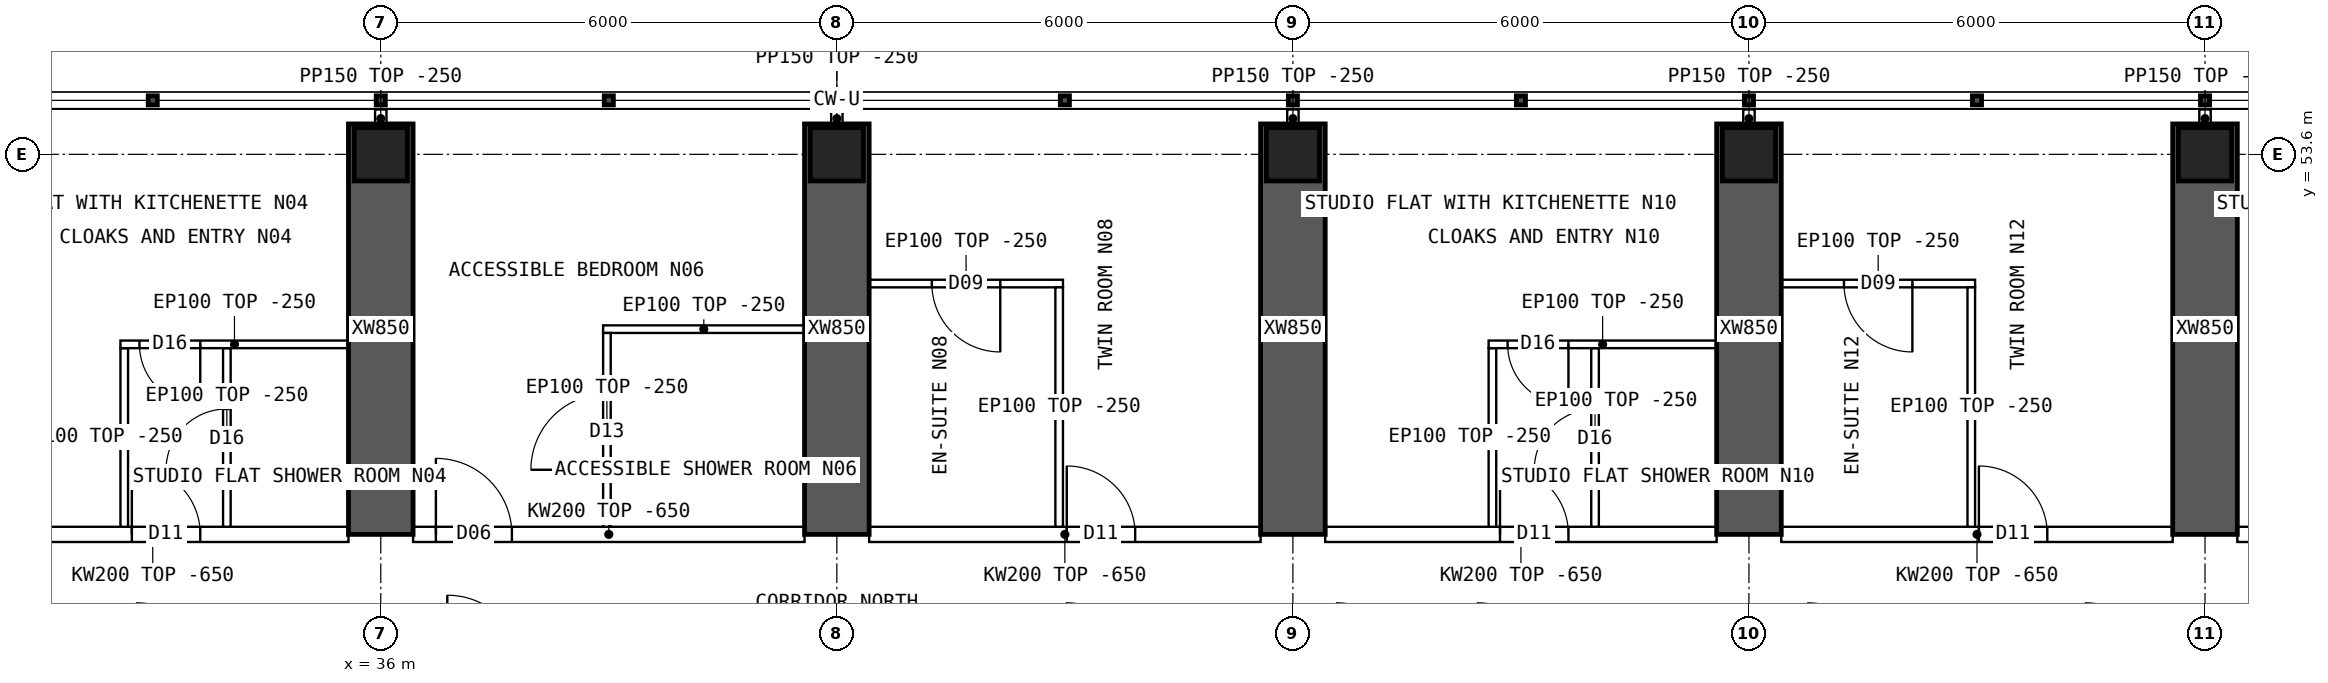
"""IFC4 building model, lengths in metres.
Left out: names, types, materials, properties, quantities, classifications, styles, units other than length and angle.
Written with IfcOpenShell. Run it as: python <this file> out.ifc"""

import sys

from ifc_helpers import new_model, si_unit, direction, frame, frame_2d, origin, origin_2d, place, context, subcontext, project, spatial, polyline, rectangle, hollow_rectangle, outline, extrude, element, fill, save


model = new_model("IFC4")
c1 = context("Model", 3, precision=1e-05, world=origin(), true_north=direction((0.0, 1.0)))
c2 = subcontext(c1, "Body", "Model", "MODEL_VIEW")
j1 = project(units=[si_unit("LENGTHUNIT", "METRE"), si_unit("PLANEANGLEUNIT", "RADIAN")], contexts=[c1])
p1 = place(None, origin())
s1 = spatial("IfcSite", under=j1, at=p1, CompositionType="ELEMENT")
p2 = place(p1, origin())
s2 = spatial("IfcBuilding", under=s1, at=p2, CompositionType="ELEMENT")
p3 = place(p2, frame((0.0, 0.0, 178.6)))
s3 = spatial("IfcBuildingStorey", under=s2, at=p3, CompositionType="ELEMENT", Elevation=178.6)
for number, where, z_axis, x_axis in (
    (1, (36.0, 53.6, 0.0), (0.0, 0.0, 1.0), (1.0, 0.0, 0.0)),
    (2, (42.0, 53.6, 0.0), (0.0, 0.0, 1.0), (1.0, 0.0, 0.0)),
    (3, (48.0, 53.6, 0.0), (0.0, 0.0, 1.0), (1.0, 0.0, 0.0)),
    (4, (54.0, 53.6, 0.0), (0.0, 0.0, 1.0), (1.0, 0.0, 0.0)),
    (5, (60.0, 53.6, 0.0), (0.0, 0.0, 1.0), (1.0, 0.0, 0.0)),
):
    element("IfcColumn", number, at=place(p3, frame(where, z_axis=z_axis, x_axis=x_axis)), inside=s3, PredefinedType="COLUMN", context=c2, shape_type="SweptSolid", body=[
        extrude(hollow_rectangle(XDim=0.7, YDim=0.7, WallThickness=0.07, at=origin_2d()), origin(), (0.0, 0.0, 1.0), 3.75),
    ])
for number, where, z_axis, x_axis in (
    (6, (36.0, 48.6, 0.0), (0.0, 0.0, 1.0), (0.0, 1.0, 0.0)),
    (7, (42.0, 48.6, 0.0), (0.0, 0.0, 1.0), (0.0, 1.0, 0.0)),
    (8, (48.0, 48.6, 0.0), (0.0, 0.0, 1.0), (0.0, 1.0, 0.0)),
    (9, (54.0, 48.6, 0.0), (0.0, 0.0, 1.0), (0.0, 1.0, 0.0)),
    (10, (60.0, 48.6, 0.0), (0.0, 0.0, 1.0), (0.0, 1.0, 0.0)),
):
    element("IfcWall", number, at=place(p3, frame(where, z_axis=z_axis, x_axis=x_axis)), inside=s3, PredefinedType="SHEAR", context=c2, shape_type="SweptSolid", body=[
        extrude(rectangle(XDim=5.4, YDim=0.85, at=frame_2d((2.7, 0.0))), origin(), (0.0, 0.0, 1.0), 3.75),
    ])
p4 = place(p3, frame((30.425, 48.6, 0.0), z_axis=(0.0, 0.0, 1.0), x_axis=(1.0, 0.0, 0.0)))
e11 = element("IfcWall", 11, at=p4, inside=s3, PredefinedType="SOLIDWALL", context=c2, shape_type="SweptSolid", body=[
    extrude(outline(polyline([(0.0, 0.0), (5.15, 0.0), (5.15, 3.1), (0.0, 3.1), (0.0, 0.0)])), frame((0.0, 0.1, 0.0), z_axis=(0.0, -1.0, 0.0), x_axis=(1.0, 0.0, 0.0)), (0.0, 0.0, 1.0), 0.2),
])
p5 = place(p4, frame((2.3, 0.0, 0.0)))
e12 = element("IfcOpeningElement", 12, at=p5, cuts=e11, PredefinedType="OPENING", context=c2, shape_type="SweptSolid", body=[
    extrude(rectangle(XDim=0.9, YDim=2.1, at=frame_2d((0.45, 1.05))), frame((0.0, 0.11, 0.0), z_axis=(0.0, -1.0, 0.0), x_axis=(1.0, 0.0, 0.0)), (0.0, 0.0, 1.0), 0.22),
])
p6 = place(p3, frame((36.425, 48.6, 0.0), z_axis=(0.0, 0.0, 1.0), x_axis=(1.0, 0.0, 0.0)))
e13 = element("IfcWall", 13, at=p6, inside=s3, PredefinedType="SOLIDWALL", context=c2, shape_type="SweptSolid", body=[
    extrude(outline(polyline([(0.0, 0.0), (5.15, 0.0), (5.15, 3.1), (0.0, 3.1), (0.0, 0.0)])), frame((0.0, 0.1, 0.0), z_axis=(0.0, -1.0, 0.0), x_axis=(1.0, 0.0, 0.0)), (0.0, 0.0, 1.0), 0.2),
])
p7 = place(p6, frame((0.3, 0.0, 0.0)))
e14 = element("IfcOpeningElement", 14, at=p7, cuts=e13, PredefinedType="OPENING", context=c2, shape_type="SweptSolid", body=[
    extrude(rectangle(XDim=1.0, YDim=2.1, at=frame_2d((0.5, 1.05))), frame((0.0, 0.11, 0.0), z_axis=(0.0, -1.0, 0.0), x_axis=(1.0, 0.0, 0.0)), (0.0, 0.0, 1.0), 0.22),
])
p8 = place(p3, frame((42.425, 48.6, 0.0), z_axis=(0.0, 0.0, 1.0), x_axis=(1.0, 0.0, 0.0)))
e15 = element("IfcWall", 15, at=p8, inside=s3, PredefinedType="SOLIDWALL", context=c2, shape_type="SweptSolid", body=[
    extrude(outline(polyline([(0.0, 0.0), (5.15, 0.0), (5.15, 3.1), (0.0, 3.1), (0.0, 0.0)])), frame((0.0, 0.1, 0.0), z_axis=(0.0, -1.0, 0.0), x_axis=(1.0, 0.0, 0.0)), (0.0, 0.0, 1.0), 0.2),
])
p9 = place(p8, frame((2.6, 0.0, 0.0)))
e16 = element("IfcOpeningElement", 16, at=p9, cuts=e15, PredefinedType="OPENING", context=c2, shape_type="SweptSolid", body=[
    extrude(rectangle(XDim=0.9, YDim=2.1, at=frame_2d((0.45, 1.05))), frame((0.0, 0.11, 0.0), z_axis=(0.0, -1.0, 0.0), x_axis=(1.0, 0.0, 0.0)), (0.0, 0.0, 1.0), 0.22),
])
p10 = place(p3, frame((48.425, 48.6, 0.0), z_axis=(0.0, 0.0, 1.0), x_axis=(1.0, 0.0, 0.0)))
e17 = element("IfcWall", 17, at=p10, inside=s3, PredefinedType="SOLIDWALL", context=c2, shape_type="SweptSolid", body=[
    extrude(outline(polyline([(0.0, 0.0), (5.15, 0.0), (5.15, 3.1), (0.0, 3.1), (0.0, 0.0)])), frame((0.0, 0.1, 0.0), z_axis=(0.0, -1.0, 0.0), x_axis=(1.0, 0.0, 0.0)), (0.0, 0.0, 1.0), 0.2),
])
p11 = place(p10, frame((2.3, 0.0, 0.0)))
e18 = element("IfcOpeningElement", 18, at=p11, cuts=e17, PredefinedType="OPENING", context=c2, shape_type="SweptSolid", body=[
    extrude(rectangle(XDim=0.9, YDim=2.1, at=frame_2d((0.45, 1.05))), frame((0.0, 0.11, 0.0), z_axis=(0.0, -1.0, 0.0), x_axis=(1.0, 0.0, 0.0)), (0.0, 0.0, 1.0), 0.22),
])
p12 = place(p3, frame((54.425, 48.6, 0.0), z_axis=(0.0, 0.0, 1.0), x_axis=(1.0, 0.0, 0.0)))
e19 = element("IfcWall", 19, at=p12, inside=s3, PredefinedType="SOLIDWALL", context=c2, shape_type="SweptSolid", body=[
    extrude(outline(polyline([(0.0, 0.0), (5.15, 0.0), (5.15, 3.1), (0.0, 3.1), (0.0, 0.0)])), frame((0.0, 0.1, 0.0), z_axis=(0.0, -1.0, 0.0), x_axis=(1.0, 0.0, 0.0)), (0.0, 0.0, 1.0), 0.2),
])
p13 = place(p12, frame((2.6, 0.0, 0.0)))
e20 = element("IfcOpeningElement", 20, at=p13, cuts=e19, PredefinedType="OPENING", context=c2, shape_type="SweptSolid", body=[
    extrude(rectangle(XDim=0.9, YDim=2.1, at=frame_2d((0.45, 1.05))), frame((0.0, 0.11, 0.0), z_axis=(0.0, -1.0, 0.0), x_axis=(1.0, 0.0, 0.0)), (0.0, 0.0, 1.0), 0.22),
])
p14 = place(p3, frame((60.425, 48.6, 0.0), z_axis=(0.0, 0.0, 1.0), x_axis=(1.0, 0.0, 0.0)))
e21 = element("IfcWall", 21, at=p14, inside=s3, PredefinedType="SOLIDWALL", context=c2, shape_type="SweptSolid", body=[
    extrude(outline(polyline([(0.0, 0.0), (5.15, 0.0), (5.15, 3.1), (0.0, 3.1), (0.0, 0.0)])), frame((0.0, 0.1, 0.0), z_axis=(0.0, -1.0, 0.0), x_axis=(1.0, 0.0, 0.0)), (0.0, 0.0, 1.0), 0.2),
])
p15 = place(p14, frame((2.3, 0.0, 0.0)))
e22 = element("IfcOpeningElement", 22, at=p15, cuts=e21, PredefinedType="OPENING", context=c2, shape_type="SweptSolid", body=[
    extrude(rectangle(XDim=0.9, YDim=2.1, at=frame_2d((0.45, 1.05))), frame((0.0, 0.11, 0.0), z_axis=(0.0, -1.0, 0.0), x_axis=(1.0, 0.0, 0.0)), (0.0, 0.0, 1.0), 0.22),
])
p16 = place(p3, frame((32.575, 51.1, 0.0), z_axis=(0.0, 0.0, 1.0), x_axis=(1.0, 0.0, 0.0)))
e23 = element("IfcWall", 23, at=p16, inside=s3, PredefinedType="PARTITIONING", context=c2, shape_type="SweptSolid", body=[
    extrude(rectangle(XDim=3.0, YDim=0.1, at=frame_2d((1.5, 0.0))), origin(), (0.0, 0.0, 1.0), 3.5),
])
p17 = place(p16, frame((0.25, 0.0, 0.0)))
e24 = element("IfcOpeningElement", 24, at=p17, cuts=e23, PredefinedType="OPENING", context=c2, shape_type="SweptSolid", body=[
    extrude(rectangle(XDim=0.8, YDim=2.1, at=frame_2d((0.4, 1.05))), frame((0.0, 0.06, 0.0), z_axis=(0.0, -1.0, 0.0), x_axis=(1.0, 0.0, 0.0)), (0.0, 0.0, 1.0), 0.12),
])
p18 = place(p3, frame((32.625, 51.05, 0.0), z_axis=(0.0, 0.0, 1.0), x_axis=(0.0, -1.0, 0.0)))
e25 = element("IfcWall", 25, at=p18, inside=s3, PredefinedType="PARTITIONING", context=c2, shape_type="SweptSolid", body=[
    extrude(outline(polyline([(0.0, 0.0), (2.35, 0.0), (2.35, 3.1), (2.302, 3.1), (2.3, 3.5), (0.0, 3.5), (0.0, 0.0)])), frame((0.0, 0.05, 0.0), z_axis=(0.0, -1.0, 0.0), x_axis=(1.0, 0.0, 0.0)), (0.0, 0.0, 1.0), 0.1),
])
p19 = place(p3, frame((33.975, 51.05, 0.0), z_axis=(0.0, 0.0, 1.0), x_axis=(0.0, -1.0, 0.0)))
e26 = element("IfcWall", 26, at=p19, inside=s3, PredefinedType="PARTITIONING", context=c2, shape_type="SweptSolid", body=[
    extrude(outline(polyline([(0.0, 0.0), (2.35, 0.0), (2.35, 3.1), (2.302, 3.1), (2.3, 3.5), (0.0, 3.5), (0.0, 0.0)])), frame((0.0, 0.05, 0.0), z_axis=(0.0, -1.0, 0.0), x_axis=(1.0, 0.0, 0.0)), (0.0, 0.0, 1.0), 0.1),
])
p20 = place(p19, frame((0.8, 0.0, 0.0)))
e27 = element("IfcOpeningElement", 27, at=p20, cuts=e26, PredefinedType="OPENING", context=c2, shape_type="SweptSolid", body=[
    extrude(rectangle(XDim=0.8, YDim=2.1, at=frame_2d((0.4, 1.05))), frame((0.0, 0.06, 0.0), z_axis=(0.0, -1.0, 0.0), x_axis=(1.0, 0.0, 0.0)), (0.0, 0.0, 1.0), 0.12),
])
p21 = place(p3, frame((38.925, 51.3, 0.0), z_axis=(0.0, 0.0, 1.0), x_axis=(1.0, 0.0, 0.0)))
e28 = element("IfcWall", 28, at=p21, inside=s3, PredefinedType="PARTITIONING", context=c2, shape_type="SweptSolid", body=[
    extrude(rectangle(XDim=2.65, YDim=0.1, at=frame_2d((1.325, 0.0))), origin(), (0.0, 0.0, 1.0), 3.5),
])
p22 = place(p3, frame((38.975, 51.25, 0.0), z_axis=(0.0, 0.0, 1.0), x_axis=(0.0, -1.0, 0.0)))
e29 = element("IfcWall", 29, at=p22, inside=s3, PredefinedType="PARTITIONING", context=c2, shape_type="SweptSolid", body=[
    extrude(outline(polyline([(0.0, 0.0), (2.55, 0.0), (2.55, 3.1), (2.502, 3.1), (2.5, 3.5), (0.0, 3.5), (0.0, 0.0)])), frame((0.0, 0.05, 0.0), z_axis=(0.0, -1.0, 0.0), x_axis=(1.0, 0.0, 0.0)), (0.0, 0.0, 1.0), 0.1),
])
p23 = place(p22, frame((0.8, 0.0, 0.0)))
e30 = element("IfcOpeningElement", 30, at=p23, cuts=e29, PredefinedType="OPENING", context=c2, shape_type="SweptSolid", body=[
    extrude(rectangle(XDim=1.0, YDim=2.1, at=frame_2d((0.5, 1.05))), frame((0.0, 0.06, 0.0), z_axis=(0.0, -1.0, 0.0), x_axis=(1.0, 0.0, 0.0)), (0.0, 0.0, 1.0), 0.12),
])
p24 = place(p3, frame((42.425, 51.9, 0.0), z_axis=(0.0, 0.0, 1.0), x_axis=(1.0, 0.0, 0.0)))
e31 = element("IfcWall", 31, at=p24, inside=s3, PredefinedType="PARTITIONING", context=c2, shape_type="SweptSolid", body=[
    extrude(rectangle(XDim=2.55, YDim=0.1, at=frame_2d((1.275, 0.0))), origin(), (0.0, 0.0, 1.0), 3.5),
])
p25 = place(p24, frame((0.825, 0.0, 0.0)))
e32 = element("IfcOpeningElement", 32, at=p25, cuts=e31, PredefinedType="OPENING", context=c2, shape_type="SweptSolid", body=[
    extrude(rectangle(XDim=0.9, YDim=2.1, at=frame_2d((0.45, 1.05))), frame((0.0, 0.06, 0.0), z_axis=(0.0, -1.0, 0.0), x_axis=(1.0, 0.0, 0.0)), (0.0, 0.0, 1.0), 0.12),
])
p26 = place(p3, frame((44.925, 51.85, 0.0), z_axis=(0.0, 0.0, 1.0), x_axis=(0.0, -1.0, 0.0)))
e33 = element("IfcWall", 33, at=p26, inside=s3, PredefinedType="PARTITIONING", context=c2, shape_type="SweptSolid", body=[
    extrude(outline(polyline([(0.0, 0.0), (3.15, 0.0), (3.15, 3.1), (3.102, 3.1), (3.1, 3.5), (0.0, 3.5), (0.0, 0.0)])), frame((0.0, 0.05, 0.0), z_axis=(0.0, -1.0, 0.0), x_axis=(1.0, 0.0, 0.0)), (0.0, 0.0, 1.0), 0.1),
])
p27 = place(p3, frame((50.575, 51.1, 0.0), z_axis=(0.0, 0.0, 1.0), x_axis=(1.0, 0.0, 0.0)))
e34 = element("IfcWall", 34, at=p27, inside=s3, PredefinedType="PARTITIONING", context=c2, shape_type="SweptSolid", body=[
    extrude(rectangle(XDim=3.0, YDim=0.1, at=frame_2d((1.5, 0.0))), origin(), (0.0, 0.0, 1.0), 3.5),
])
p28 = place(p27, frame((0.25, 0.0, 0.0)))
e35 = element("IfcOpeningElement", 35, at=p28, cuts=e34, PredefinedType="OPENING", context=c2, shape_type="SweptSolid", body=[
    extrude(rectangle(XDim=0.8, YDim=2.1, at=frame_2d((0.4, 1.05))), frame((0.0, 0.06, 0.0), z_axis=(0.0, -1.0, 0.0), x_axis=(1.0, 0.0, 0.0)), (0.0, 0.0, 1.0), 0.12),
])
p29 = place(p3, frame((50.625, 51.05, 0.0), z_axis=(0.0, 0.0, 1.0), x_axis=(0.0, -1.0, 0.0)))
e36 = element("IfcWall", 36, at=p29, inside=s3, PredefinedType="PARTITIONING", context=c2, shape_type="SweptSolid", body=[
    extrude(outline(polyline([(0.0, 0.0), (2.35, 0.0), (2.35, 3.1), (2.302, 3.1), (2.3, 3.5), (0.0, 3.5), (0.0, 0.0)])), frame((0.0, 0.05, 0.0), z_axis=(0.0, -1.0, 0.0), x_axis=(1.0, 0.0, 0.0)), (0.0, 0.0, 1.0), 0.1),
])
p30 = place(p3, frame((51.975, 51.05, 0.0), z_axis=(0.0, 0.0, 1.0), x_axis=(0.0, -1.0, 0.0)))
e37 = element("IfcWall", 37, at=p30, inside=s3, PredefinedType="PARTITIONING", context=c2, shape_type="SweptSolid", body=[
    extrude(outline(polyline([(0.0, 0.0), (2.35, 0.0), (2.35, 3.1), (2.302, 3.1), (2.3, 3.5), (0.0, 3.5), (0.0, 0.0)])), frame((0.0, 0.05, 0.0), z_axis=(0.0, -1.0, 0.0), x_axis=(1.0, 0.0, 0.0)), (0.0, 0.0, 1.0), 0.1),
])
p31 = place(p30, frame((0.8, 0.0, 0.0)))
e38 = element("IfcOpeningElement", 38, at=p31, cuts=e37, PredefinedType="OPENING", context=c2, shape_type="SweptSolid", body=[
    extrude(rectangle(XDim=0.8, YDim=2.1, at=frame_2d((0.4, 1.05))), frame((0.0, 0.06, 0.0), z_axis=(0.0, -1.0, 0.0), x_axis=(1.0, 0.0, 0.0)), (0.0, 0.0, 1.0), 0.12),
])
p32 = place(p3, frame((54.425, 51.9, 0.0), z_axis=(0.0, 0.0, 1.0), x_axis=(1.0, 0.0, 0.0)))
e39 = element("IfcWall", 39, at=p32, inside=s3, PredefinedType="PARTITIONING", context=c2, shape_type="SweptSolid", body=[
    extrude(rectangle(XDim=2.55, YDim=0.1, at=frame_2d((1.275, 0.0))), origin(), (0.0, 0.0, 1.0), 3.5),
])
p33 = place(p32, frame((0.825, 0.0, 0.0)))
e40 = element("IfcOpeningElement", 40, at=p33, cuts=e39, PredefinedType="OPENING", context=c2, shape_type="SweptSolid", body=[
    extrude(rectangle(XDim=0.9, YDim=2.1, at=frame_2d((0.45, 1.05))), frame((0.0, 0.06, 0.0), z_axis=(0.0, -1.0, 0.0), x_axis=(1.0, 0.0, 0.0)), (0.0, 0.0, 1.0), 0.12),
])
p34 = place(p3, frame((56.925, 51.85, 0.0), z_axis=(0.0, 0.0, 1.0), x_axis=(0.0, -1.0, 0.0)))
e41 = element("IfcWall", 41, at=p34, inside=s3, PredefinedType="PARTITIONING", context=c2, shape_type="SweptSolid", body=[
    extrude(outline(polyline([(0.0, 0.0), (3.15, 0.0), (3.15, 3.1), (3.102, 3.1), (3.1, 3.5), (0.0, 3.5), (0.0, 0.0)])), frame((0.0, 0.05, 0.0), z_axis=(0.0, -1.0, 0.0), x_axis=(1.0, 0.0, 0.0)), (0.0, 0.0, 1.0), 0.1),
])
for number, where, z_axis, x_axis in (
    (42, (36.0, 53.95, 0.0), (0.0, 0.0, 1.0), (0.0, 1.0, 0.0)),
    (43, (42.0, 53.95, 0.0), (0.0, 0.0, 1.0), (0.0, 1.0, 0.0)),
    (44, (48.0, 53.95, 0.0), (0.0, 0.0, 1.0), (0.0, 1.0, 0.0)),
    (45, (54.0, 53.95, 0.0), (0.0, 0.0, 1.0), (0.0, 1.0, 0.0)),
    (46, (60.0, 53.95, 0.0), (0.0, 0.0, 1.0), (0.0, 1.0, 0.0)),
):
    element("IfcWall", number, at=place(p3, frame(where, z_axis=z_axis, x_axis=x_axis)), inside=s3, PredefinedType="PARTITIONING", context=c2, shape_type="SweptSolid", body=[
        extrude(rectangle(XDim=0.24, YDim=0.15, at=frame_2d((0.12, 0.0))), origin(), (0.0, 0.0, 1.0), 3.5),
    ])
p35 = place(p17, origin())
e47 = element("IfcDoor", 47, at=p35, inside=s3, OperationType="SINGLE_SWING_RIGHT", PredefinedType="DOOR", context=c2, shape_type="SweptSolid", body=[
    extrude(rectangle(XDim=0.8, YDim=2.1, at=frame_2d((0.4, 1.05))), frame((0.0, 0.025, 0.0), z_axis=(0.0, -1.0, 0.0), x_axis=(1.0, 0.0, 0.0)), (0.0, 0.0, 1.0), 0.05),
])
fill(e24, e47)
p36 = place(p20, origin())
e48 = element("IfcDoor", 48, at=p36, inside=s3, OperationType="SINGLE_SWING_RIGHT", PredefinedType="DOOR", context=c2, shape_type="SweptSolid", body=[
    extrude(rectangle(XDim=0.8, YDim=2.1, at=frame_2d((0.4, 1.05))), frame((0.0, 0.025, 0.0), z_axis=(0.0, -1.0, 0.0), x_axis=(1.0, 0.0, 0.0)), (0.0, 0.0, 1.0), 0.05),
])
fill(e27, e48)
p37 = place(p5, origin())
e49 = element("IfcDoor", 49, at=p37, inside=s3, OperationType="SINGLE_SWING_LEFT", PredefinedType="DOOR", context=c2, shape_type="SweptSolid", body=[
    extrude(rectangle(XDim=0.9, YDim=2.1, at=frame_2d((0.45, 1.05))), frame((0.0, 0.025, 0.0), z_axis=(0.0, -1.0, 0.0), x_axis=(1.0, 0.0, 0.0)), (0.0, 0.0, 1.0), 0.05),
])
fill(e12, e49)
p38 = place(p23, origin())
e50 = element("IfcDoor", 50, at=p38, inside=s3, OperationType="SINGLE_SWING_RIGHT", PredefinedType="DOOR", context=c2, shape_type="SweptSolid", body=[
    extrude(rectangle(XDim=1.0, YDim=2.1, at=frame_2d((0.5, 1.05))), frame((0.0, 0.025, 0.0), z_axis=(0.0, -1.0, 0.0), x_axis=(1.0, 0.0, 0.0)), (0.0, 0.0, 1.0), 0.05),
])
fill(e30, e50)
p39 = place(p7, origin())
e51 = element("IfcDoor", 51, at=p39, inside=s3, OperationType="SINGLE_SWING_LEFT", PredefinedType="DOOR", context=c2, shape_type="SweptSolid", body=[
    extrude(rectangle(XDim=1.0, YDim=2.1, at=frame_2d((0.5, 1.05))), frame((0.0, 0.025, 0.0), z_axis=(0.0, -1.0, 0.0), x_axis=(1.0, 0.0, 0.0)), (0.0, 0.0, 1.0), 0.05),
])
fill(e14, e51)
p40 = place(p25, origin())
e52 = element("IfcDoor", 52, at=p40, inside=s3, OperationType="SINGLE_SWING_RIGHT", PredefinedType="DOOR", context=c2, shape_type="SweptSolid", body=[
    extrude(rectangle(XDim=0.9, YDim=2.1, at=frame_2d((0.45, 1.05))), frame((0.0, 0.025, 0.0), z_axis=(0.0, -1.0, 0.0), x_axis=(1.0, 0.0, 0.0)), (0.0, 0.0, 1.0), 0.05),
])
fill(e32, e52)
p41 = place(p9, origin())
e53 = element("IfcDoor", 53, at=p41, inside=s3, OperationType="SINGLE_SWING_LEFT", PredefinedType="DOOR", context=c2, shape_type="SweptSolid", body=[
    extrude(rectangle(XDim=0.9, YDim=2.1, at=frame_2d((0.45, 1.05))), frame((0.0, 0.025, 0.0), z_axis=(0.0, -1.0, 0.0), x_axis=(1.0, 0.0, 0.0)), (0.0, 0.0, 1.0), 0.05),
])
fill(e16, e53)
p42 = place(p28, origin())
e54 = element("IfcDoor", 54, at=p42, inside=s3, OperationType="SINGLE_SWING_RIGHT", PredefinedType="DOOR", context=c2, shape_type="SweptSolid", body=[
    extrude(rectangle(XDim=0.8, YDim=2.1, at=frame_2d((0.4, 1.05))), frame((0.0, 0.025, 0.0), z_axis=(0.0, -1.0, 0.0), x_axis=(1.0, 0.0, 0.0)), (0.0, 0.0, 1.0), 0.05),
])
fill(e35, e54)
p43 = place(p31, origin())
e55 = element("IfcDoor", 55, at=p43, inside=s3, OperationType="SINGLE_SWING_RIGHT", PredefinedType="DOOR", context=c2, shape_type="SweptSolid", body=[
    extrude(rectangle(XDim=0.8, YDim=2.1, at=frame_2d((0.4, 1.05))), frame((0.0, 0.025, 0.0), z_axis=(0.0, -1.0, 0.0), x_axis=(1.0, 0.0, 0.0)), (0.0, 0.0, 1.0), 0.05),
])
fill(e38, e55)
p44 = place(p11, origin())
e56 = element("IfcDoor", 56, at=p44, inside=s3, OperationType="SINGLE_SWING_LEFT", PredefinedType="DOOR", context=c2, shape_type="SweptSolid", body=[
    extrude(rectangle(XDim=0.9, YDim=2.1, at=frame_2d((0.45, 1.05))), frame((0.0, 0.025, 0.0), z_axis=(0.0, -1.0, 0.0), x_axis=(1.0, 0.0, 0.0)), (0.0, 0.0, 1.0), 0.05),
])
fill(e18, e56)
p45 = place(p33, origin())
e57 = element("IfcDoor", 57, at=p45, inside=s3, OperationType="SINGLE_SWING_RIGHT", PredefinedType="DOOR", context=c2, shape_type="SweptSolid", body=[
    extrude(rectangle(XDim=0.9, YDim=2.1, at=frame_2d((0.45, 1.05))), frame((0.0, 0.025, 0.0), z_axis=(0.0, -1.0, 0.0), x_axis=(1.0, 0.0, 0.0)), (0.0, 0.0, 1.0), 0.05),
])
fill(e40, e57)
p46 = place(p13, origin())
e58 = element("IfcDoor", 58, at=p46, inside=s3, OperationType="SINGLE_SWING_LEFT", PredefinedType="DOOR", context=c2, shape_type="SweptSolid", body=[
    extrude(rectangle(XDim=0.9, YDim=2.1, at=frame_2d((0.45, 1.05))), frame((0.0, 0.025, 0.0), z_axis=(0.0, -1.0, 0.0), x_axis=(1.0, 0.0, 0.0)), (0.0, 0.0, 1.0), 0.05),
])
fill(e20, e58)
save(model, sys.argv[1])
